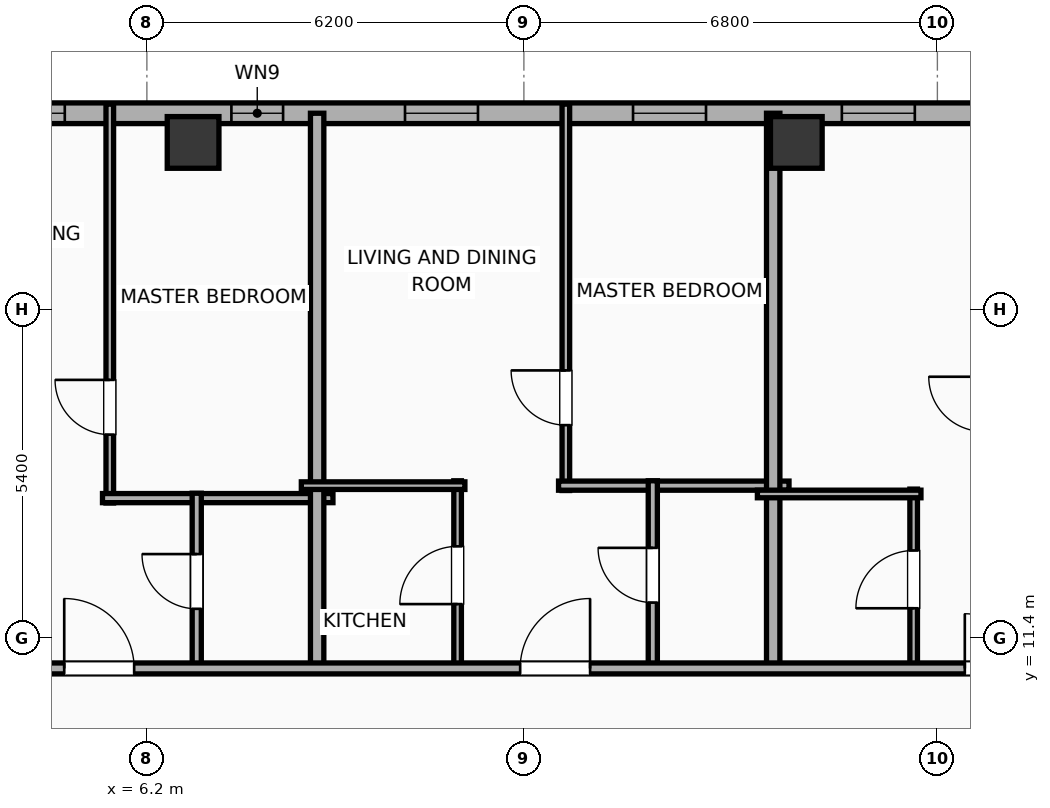
"""IFC4 building model, lengths in metres.
Left out: names, types, materials, properties, quantities, classifications, styles, units other than length and angle.
Written with IfcOpenShell. Run it as: python <this file> out.ifc"""

import sys

from ifc_helpers import new_model, si_unit, direction, frame, frame_2d, origin, origin_2d, place, context, subcontext, project, spatial, rectangle, hollow_rectangle, extrude, element, fill, save


model = new_model("IFC4")
c1 = context("Model", 3, precision=1e-05, world=origin(), true_north=direction((0.0, 1.0)))
c2 = subcontext(c1, "Body", "Model", "MODEL_VIEW")
j1 = project(units=[si_unit("LENGTHUNIT", "METRE"), si_unit("PLANEANGLEUNIT", "RADIAN")], contexts=[c1])
p1 = place(None, origin())
s1 = spatial("IfcSite", under=j1, at=p1, CompositionType="ELEMENT")
p2 = place(p1, origin())
s2 = spatial("IfcBuilding", under=s1, at=p2, CompositionType="ELEMENT")
p3 = place(p2, frame((0.0, 0.0, 243.1)))
s3 = spatial("IfcBuildingStorey", under=s2, at=p3, CompositionType="ELEMENT", Elevation=243.1)
for number, where, z_axis, x_axis in (
    (1, (16.88, 19.55, 0.0), (0.0, 0.0, 1.0), (1.0, 0.0, 0.0)),
    (2, (6.96, 19.55, 0.0), (0.0, 0.0, 1.0), (1.0, 0.0, 0.0)),
):
    element("IfcColumn", number, at=place(p3, frame(where, z_axis=z_axis, x_axis=x_axis)), inside=s3, PredefinedType="COLUMN", context=c2, shape_type="SweptSolid", body=[
        extrude(hollow_rectangle(XDim=0.85, YDim=0.85, WallThickness=0.028, at=origin_2d()), origin(), (0.0, 0.0, 1.0), 3.9),
    ])
p4 = place(p3, frame((-22.783, 20.03, 0.0), z_axis=(0.0, 0.0, 1.0), x_axis=(1.0, 0.0, 0.0)))
e3 = element("IfcWall", 3, at=p4, inside=s3, PredefinedType="ELEMENTEDWALL", context=c2, shape_type="SweptSolid", body=[
    extrude(rectangle(XDim=49.566, YDim=0.34, at=frame_2d((24.783, 0.0))), origin(), (0.0, 0.0, 1.0), 3.65),
])
p5 = place(p4, frame((6.211, 0.0, 0.75)))
e4 = element("IfcOpeningElement", 4, at=p5, cuts=e3, PredefinedType="OPENING", context=c2, shape_type="SweptSolid", body=[
    extrude(rectangle(XDim=2.4, YDim=2.1, at=frame_2d((1.2, 1.05))), frame((0.0, 0.18, 0.0), z_axis=(0.0, -1.0, 0.0), x_axis=(1.0, 0.0, 0.0)), (0.0, 0.0, 1.0), 0.36),
])
p6 = place(p4, frame((25.233, 0.0, 0.75)))
e5 = element("IfcOpeningElement", 5, at=p6, cuts=e3, PredefinedType="OPENING", context=c2, shape_type="SweptSolid", body=[
    extrude(rectangle(XDim=2.4, YDim=2.1, at=frame_2d((1.2, 1.05))), frame((0.0, 0.18, 0.0), z_axis=(0.0, -1.0, 0.0), x_axis=(1.0, 0.0, 0.0)), (0.0, 0.0, 1.0), 0.36),
])
p7 = place(p4, frame((3.511, 0.0, 0.75)))
e6 = element("IfcOpeningElement", 6, at=p7, cuts=e3, PredefinedType="OPENING", context=c2, shape_type="SweptSolid", body=[
    extrude(rectangle(XDim=1.2, YDim=2.05, at=frame_2d((0.6, 1.025))), frame((0.0, 0.18, 0.0), z_axis=(0.0, -1.0, 0.0), x_axis=(1.0, 0.0, 0.0)), (0.0, 0.0, 1.0), 0.36),
])
p8 = place(p4, frame((10.728, 0.0, 0.75)))
e7 = element("IfcOpeningElement", 7, at=p8, cuts=e3, PredefinedType="OPENING", context=c2, shape_type="SweptSolid", body=[
    extrude(rectangle(XDim=1.2, YDim=2.05, at=frame_2d((0.6, 1.025))), frame((0.0, 0.18, 0.0), z_axis=(0.0, -1.0, 0.0), x_axis=(1.0, 0.0, 0.0)), (0.0, 0.0, 1.0), 0.36),
])
p9 = place(p4, frame((14.478, 0.0, 0.75)))
e8 = element("IfcOpeningElement", 8, at=p9, cuts=e3, PredefinedType="OPENING", context=c2, shape_type="SweptSolid", body=[
    extrude(rectangle(XDim=1.2, YDim=2.05, at=frame_2d((0.6, 1.025))), frame((0.0, 0.18, 0.0), z_axis=(0.0, -1.0, 0.0), x_axis=(1.0, 0.0, 0.0)), (0.0, 0.0, 1.0), 0.36),
])
p10 = place(p4, frame((17.988, 0.0, 0.75)))
e9 = element("IfcOpeningElement", 9, at=p10, cuts=e3, PredefinedType="OPENING", context=c2, shape_type="SweptSolid", body=[
    extrude(rectangle(XDim=1.2, YDim=2.05, at=frame_2d((0.6, 1.025))), frame((0.0, 0.18, 0.0), z_axis=(0.0, -1.0, 0.0), x_axis=(1.0, 0.0, 0.0)), (0.0, 0.0, 1.0), 0.36),
])
p11 = place(p4, frame((21.978, 0.0, 0.75)))
e10 = element("IfcOpeningElement", 10, at=p11, cuts=e3, PredefinedType="OPENING", context=c2, shape_type="SweptSolid", body=[
    extrude(rectangle(XDim=1.2, YDim=2.05, at=frame_2d((0.6, 1.025))), frame((0.0, 0.18, 0.0), z_axis=(0.0, -1.0, 0.0), x_axis=(1.0, 0.0, 0.0)), (0.0, 0.0, 1.0), 0.36),
])
p12 = place(p4, frame((30.373, 0.0, 0.75)))
e11 = element("IfcOpeningElement", 11, at=p12, cuts=e3, PredefinedType="OPENING", context=c2, shape_type="SweptSolid", body=[
    extrude(rectangle(XDim=0.85, YDim=2.05, at=frame_2d((0.425, 1.025))), frame((0.0, 0.18, 0.0), z_axis=(0.0, -1.0, 0.0), x_axis=(1.0, 0.0, 0.0)), (0.0, 0.0, 1.0), 0.36),
])
p13 = place(p4, frame((33.228, 0.0, 0.75)))
e12 = element("IfcOpeningElement", 12, at=p13, cuts=e3, PredefinedType="OPENING", context=c2, shape_type="SweptSolid", body=[
    extrude(rectangle(XDim=1.2, YDim=2.05, at=frame_2d((0.6, 1.025))), frame((0.0, 0.18, 0.0), z_axis=(0.0, -1.0, 0.0), x_axis=(1.0, 0.0, 0.0)), (0.0, 0.0, 1.0), 0.36),
])
p14 = place(p4, frame((36.978, 0.0, 0.75)))
e13 = element("IfcOpeningElement", 13, at=p14, cuts=e3, PredefinedType="OPENING", context=c2, shape_type="SweptSolid", body=[
    extrude(rectangle(XDim=1.2, YDim=2.05, at=frame_2d((0.6, 1.025))), frame((0.0, 0.18, 0.0), z_axis=(0.0, -1.0, 0.0), x_axis=(1.0, 0.0, 0.0)), (0.0, 0.0, 1.0), 0.36),
])
p15 = place(p4, frame((40.412, 0.0, 0.75)))
e14 = element("IfcOpeningElement", 14, at=p15, cuts=e3, PredefinedType="OPENING", context=c2, shape_type="SweptSolid", body=[
    extrude(rectangle(XDim=1.2, YDim=2.05, at=frame_2d((0.6, 1.025))), frame((0.0, 0.18, 0.0), z_axis=(0.0, -1.0, 0.0), x_axis=(1.0, 0.0, 0.0)), (0.0, 0.0, 1.0), 0.36),
])
p16 = place(p4, frame((43.846, 0.0, 0.75)))
e15 = element("IfcOpeningElement", 15, at=p16, cuts=e3, PredefinedType="OPENING", context=c2, shape_type="SweptSolid", body=[
    extrude(rectangle(XDim=1.2, YDim=2.05, at=frame_2d((0.6, 1.025))), frame((0.0, 0.18, 0.0), z_axis=(0.0, -1.0, 0.0), x_axis=(1.0, 0.0, 0.0)), (0.0, 0.0, 1.0), 0.36),
])
p17 = place(p4, frame((46.814, 0.0, 0.75)))
e16 = element("IfcOpeningElement", 16, at=p17, cuts=e3, PredefinedType="OPENING", context=c2, shape_type="SweptSolid", body=[
    extrude(rectangle(XDim=1.2, YDim=2.05, at=frame_2d((0.6, 1.025))), frame((0.0, 0.18, 0.0), z_axis=(0.0, -1.0, 0.0), x_axis=(1.0, 0.0, 0.0)), (0.0, 0.0, 1.0), 0.36),
])
p18 = place(p3, frame((5.59, 13.621, 0.0), z_axis=(0.0, 0.0, 1.0), x_axis=(0.0, 1.0, 0.0)))
e17 = element("IfcWall", 17, at=p18, inside=s3, PredefinedType="PARTITIONING", context=c2, shape_type="SweptSolid", body=[
    extrude(rectangle(XDim=6.559, YDim=0.125, at=frame_2d((3.279, 0.0))), origin(), (0.0, 0.0, 1.0), 3.09),
])
p19 = place(p18, frame((1.124, 0.0, 0.0)))
e18 = element("IfcOpeningElement", 18, at=p19, cuts=e17, PredefinedType="OPENING", context=c2, shape_type="SweptSolid", body=[
    extrude(rectangle(XDim=0.9, YDim=2.05, at=frame_2d((0.45, 1.025))), frame((0.0, 0.073, 0.0), z_axis=(0.0, -1.0, 0.0), x_axis=(1.0, 0.0, 0.0)), (0.0, 0.0, 1.0), 0.145),
])
p20 = place(p3, frame((5.47, 13.701, 0.0), z_axis=(0.0, 0.0, 1.0), x_axis=(1.0, 0.0, 0.0)))
e19 = element("IfcWall", 19, at=p20, inside=s3, PredefinedType="PLUMBINGWALL", context=c2, shape_type="SweptSolid", body=[
    extrude(rectangle(XDim=3.79, YDim=0.15, at=frame_2d((1.895, 0.0))), origin(), (0.0, 0.0, 1.0), 3.65),
])
p21 = place(p3, frame((7.02, 10.88, 0.0), z_axis=(0.0, 0.0, 1.0), x_axis=(0.0, 1.0, 0.0)))
e20 = element("IfcWall", 20, at=p21, inside=s3, PredefinedType="PLUMBINGWALL", context=c2, shape_type="SweptSolid", body=[
    extrude(rectangle(XDim=2.901, YDim=0.15, at=frame_2d((1.451, 0.0))), origin(), (0.0, 0.0, 1.0), 3.65),
])
p22 = place(p21, frame((1.0, 0.0, 0.0)))
e21 = element("IfcOpeningElement", 21, at=p22, cuts=e20, PredefinedType="OPENING", context=c2, shape_type="SweptSolid", body=[
    extrude(rectangle(XDim=0.9, YDim=2.05, at=frame_2d((0.45, 1.025))), frame((0.0, 0.085, 0.0), z_axis=(0.0, -1.0, 0.0), x_axis=(1.0, 0.0, 0.0)), (0.0, 0.0, 1.0), 0.17),
])
p23 = place(p3, frame((9.0, 10.82, 0.0), z_axis=(0.0, 0.0, 1.0), x_axis=(0.0, 1.0, 0.0)))
e22 = element("IfcWall", 22, at=p23, inside=s3, PredefinedType="PARTITIONING", context=c2, shape_type="SweptSolid", body=[
    extrude(rectangle(XDim=9.21, YDim=0.22, at=frame_2d((4.605, 0.0))), origin(), (0.0, 0.0, 1.0), 3.65),
])
p24 = place(p3, frame((13.09, 13.826, 0.0), z_axis=(0.0, 0.0, 1.0), x_axis=(0.0, 1.0, 0.0)))
e23 = element("IfcWall", 23, at=p24, inside=s3, PredefinedType="PARTITIONING", context=c2, shape_type="SweptSolid", body=[
    extrude(rectangle(XDim=6.354, YDim=0.125, at=frame_2d((3.177, 0.0))), origin(), (0.0, 0.0, 1.0), 3.65),
])
p25 = place(p24, frame((1.075, 0.0, 0.0)))
e24 = element("IfcOpeningElement", 24, at=p25, cuts=e23, PredefinedType="OPENING", context=c2, shape_type="SweptSolid", body=[
    extrude(rectangle(XDim=0.9, YDim=2.05, at=frame_2d((0.45, 1.025))), frame((0.0, 0.073, 0.0), z_axis=(0.0, -1.0, 0.0), x_axis=(1.0, 0.0, 0.0)), (0.0, 0.0, 1.0), 0.145),
])
p26 = place(p3, frame((12.97, 13.906, 0.0), z_axis=(0.0, 0.0, 1.0), x_axis=(1.0, 0.0, 0.0)))
e25 = element("IfcWall", 25, at=p26, inside=s3, PredefinedType="PLUMBINGWALL", context=c2, shape_type="SweptSolid", body=[
    extrude(rectangle(XDim=3.79, YDim=0.15, at=frame_2d((1.895, 0.0))), origin(), (0.0, 0.0, 1.0), 3.65),
])
p27 = place(p3, frame((11.31, 10.88, 0.0), z_axis=(0.0, 0.0, 1.0), x_axis=(0.0, 1.0, 0.0)))
e26 = element("IfcWall", 26, at=p27, inside=s3, PredefinedType="PARTITIONING", context=c2, shape_type="SweptSolid", body=[
    extrude(rectangle(XDim=3.106, YDim=0.125, at=frame_2d((1.553, 0.0))), origin(), (0.0, 0.0, 1.0), 3.65),
])
p28 = place(p27, frame((1.078, 0.0, 0.0)))
e27 = element("IfcOpeningElement", 27, at=p28, cuts=e26, PredefinedType="OPENING", context=c2, shape_type="SweptSolid", body=[
    extrude(rectangle(XDim=0.95, YDim=2.05, at=frame_2d((0.475, 1.025))), frame((0.0, 0.073, 0.0), z_axis=(0.0, -1.0, 0.0), x_axis=(1.0, 0.0, 0.0)), (0.0, 0.0, 1.0), 0.145),
])
p29 = place(p3, frame((8.74, 13.906, 0.0), z_axis=(0.0, 0.0, 1.0), x_axis=(1.0, 0.0, 0.0)))
e28 = element("IfcWall", 28, at=p29, inside=s3, PredefinedType="PARTITIONING", context=c2, shape_type="SweptSolid", body=[
    extrude(rectangle(XDim=2.69, YDim=0.125, at=frame_2d((1.345, 0.0))), origin(), (0.0, 0.0, 1.0), 3.65),
])
p30 = place(p3, frame((14.52, 10.88, 0.0), z_axis=(0.0, 0.0, 1.0), x_axis=(0.0, 1.0, 0.0)))
e29 = element("IfcWall", 29, at=p30, inside=s3, PredefinedType="PLUMBINGWALL", context=c2, shape_type="SweptSolid", body=[
    extrude(rectangle(XDim=3.106, YDim=0.15, at=frame_2d((1.553, 0.0))), origin(), (0.0, 0.0, 1.0), 3.65),
])
p31 = place(p30, frame((1.103, 0.0, 0.0)))
e30 = element("IfcOpeningElement", 30, at=p31, cuts=e29, PredefinedType="OPENING", context=c2, shape_type="SweptSolid", body=[
    extrude(rectangle(XDim=0.9, YDim=2.05, at=frame_2d((0.45, 1.025))), frame((0.0, 0.085, 0.0), z_axis=(0.0, -1.0, 0.0), x_axis=(1.0, 0.0, 0.0)), (0.0, 0.0, 1.0), 0.17),
])
p32 = place(p3, frame((16.5, 10.82, 0.0), z_axis=(0.0, 0.0, 1.0), x_axis=(0.0, 1.0, 0.0)))
e31 = element("IfcWall", 31, at=p32, inside=s3, PredefinedType="PARTITIONING", context=c2, shape_type="SweptSolid", body=[
    extrude(rectangle(XDim=9.21, YDim=0.22, at=frame_2d((4.605, 0.0))), origin(), (0.0, 0.0, 1.0), 3.09),
])
p33 = place(p3, frame((18.81, 10.88, 0.0), z_axis=(0.0, 0.0, 1.0), x_axis=(0.0, 1.0, 0.0)))
e32 = element("IfcWall", 32, at=p33, inside=s3, PredefinedType="PARTITIONING", context=c2, shape_type="SweptSolid", body=[
    extrude(rectangle(XDim=2.969, YDim=0.125, at=frame_2d((1.485, 0.0))), origin(), (0.0, 0.0, 1.0), 3.65),
])
p34 = place(p33, frame((1.01, 0.0, 0.0)))
e33 = element("IfcOpeningElement", 33, at=p34, cuts=e32, PredefinedType="OPENING", context=c2, shape_type="SweptSolid", body=[
    extrude(rectangle(XDim=0.95, YDim=2.05, at=frame_2d((0.475, 1.025))), frame((0.0, 0.073, 0.0), z_axis=(0.0, -1.0, 0.0), x_axis=(1.0, 0.0, 0.0)), (0.0, 0.0, 1.0), 0.145),
])
p35 = place(p3, frame((16.24, 13.769, 0.0), z_axis=(0.0, 0.0, 1.0), x_axis=(1.0, 0.0, 0.0)))
e34 = element("IfcWall", 34, at=p35, inside=s3, PredefinedType="PARTITIONING", context=c2, shape_type="SweptSolid", body=[
    extrude(rectangle(XDim=2.69, YDim=0.125, at=frame_2d((1.345, 0.0))), origin(), (0.0, 0.0, 1.0), 3.65),
])
p36 = place(p3, frame((-26.23, 10.9, 0.0), z_axis=(0.0, 0.0, 1.0), x_axis=(1.0, 0.0, 0.0)))
e35 = element("IfcWall", 35, at=p36, inside=s3, PredefinedType="PARTITIONING", context=c2, shape_type="SweptSolid", body=[
    extrude(rectangle(XDim=56.46, YDim=0.18, at=frame_2d((28.23, 0.0))), origin(), (0.0, 0.0, 1.0), 3.65),
])
p37 = place(p36, frame((2.825, 0.0, 0.0)))
e36 = element("IfcOpeningElement", 36, at=p37, cuts=e35, PredefinedType="OPENING", context=c2, shape_type="SweptSolid", body=[
    extrude(rectangle(XDim=0.9, YDim=2.05, at=frame_2d((0.45, 1.025))), frame((0.0, 0.1, 0.0), z_axis=(0.0, -1.0, 0.0), x_axis=(1.0, 0.0, 0.0)), (0.0, 0.0, 1.0), 0.2),
])
p38 = place(p36, frame((10.135, 0.0, 0.0)))
e37 = element("IfcOpeningElement", 37, at=p38, cuts=e35, PredefinedType="OPENING", context=c2, shape_type="SweptSolid", body=[
    extrude(rectangle(XDim=1.15, YDim=2.05, at=frame_2d((0.575, 1.025))), frame((0.0, 0.1, 0.0), z_axis=(0.0, -1.0, 0.0), x_axis=(1.0, 0.0, 0.0)), (0.0, 0.0, 1.0), 0.2),
])
p39 = place(p36, frame((16.069, 0.0, 0.0)))
e38 = element("IfcOpeningElement", 38, at=p39, cuts=e35, PredefinedType="OPENING", context=c2, shape_type="SweptSolid", body=[
    extrude(rectangle(XDim=1.15, YDim=2.05, at=frame_2d((0.575, 1.025))), frame((0.0, 0.1, 0.0), z_axis=(0.0, -1.0, 0.0), x_axis=(1.0, 0.0, 0.0)), (0.0, 0.0, 1.0), 0.2),
])
p40 = place(p36, frame((23.567, 0.0, 0.0)))
e39 = element("IfcOpeningElement", 39, at=p40, cuts=e35, PredefinedType="OPENING", context=c2, shape_type="SweptSolid", body=[
    extrude(rectangle(XDim=1.15, YDim=2.05, at=frame_2d((0.575, 1.025))), frame((0.0, 0.1, 0.0), z_axis=(0.0, -1.0, 0.0), x_axis=(1.0, 0.0, 0.0)), (0.0, 0.0, 1.0), 0.2),
])
p41 = place(p36, frame((31.071, 0.0, 0.0)))
e40 = element("IfcOpeningElement", 40, at=p41, cuts=e35, PredefinedType="OPENING", context=c2, shape_type="SweptSolid", body=[
    extrude(rectangle(XDim=1.15, YDim=2.05, at=frame_2d((0.575, 1.025))), frame((0.0, 0.1, 0.0), z_axis=(0.0, -1.0, 0.0), x_axis=(1.0, 0.0, 0.0)), (0.0, 0.0, 1.0), 0.2),
])
p42 = place(p36, frame((38.569, 0.0, 0.0)))
e41 = element("IfcOpeningElement", 41, at=p42, cuts=e35, PredefinedType="OPENING", context=c2, shape_type="SweptSolid", body=[
    extrude(rectangle(XDim=1.15, YDim=2.05, at=frame_2d((0.575, 1.025))), frame((0.0, 0.1, 0.0), z_axis=(0.0, -1.0, 0.0), x_axis=(1.0, 0.0, 0.0)), (0.0, 0.0, 1.0), 0.2),
])
p43 = place(p36, frame((45.881, 0.0, 0.0)))
e42 = element("IfcOpeningElement", 42, at=p43, cuts=e35, PredefinedType="OPENING", context=c2, shape_type="SweptSolid", body=[
    extrude(rectangle(XDim=0.9, YDim=2.05, at=frame_2d((0.45, 1.025))), frame((0.0, 0.1, 0.0), z_axis=(0.0, -1.0, 0.0), x_axis=(1.0, 0.0, 0.0)), (0.0, 0.0, 1.0), 0.2),
])
p44 = place(p36, frame((52.775, 0.0, 0.0)))
e43 = element("IfcOpeningElement", 43, at=p44, cuts=e35, PredefinedType="OPENING", context=c2, shape_type="SweptSolid", body=[
    extrude(rectangle(XDim=0.9, YDim=2.05, at=frame_2d((0.45, 1.025))), frame((0.0, 0.1, 0.0), z_axis=(0.0, -1.0, 0.0), x_axis=(1.0, 0.0, 0.0)), (0.0, 0.0, 1.0), 0.2),
])
p45 = place(p6, origin())
e44 = element("IfcWindow", 44, at=p45, inside=s3, PartitioningType="SINGLE_PANEL", PredefinedType="WINDOW", context=c2, shape_type="SweptSolid", body=[
    extrude(rectangle(XDim=2.4, YDim=2.1, at=frame_2d((1.2, 1.05))), frame((0.0, 0.03, 0.0), z_axis=(0.0, -1.0, 0.0), x_axis=(1.0, 0.0, 0.0)), (0.0, 0.0, 1.0), 0.06),
])
fill(e5, e44)
p46 = place(p12, origin())
e45 = element("IfcWindow", 45, at=p46, inside=s3, PartitioningType="SINGLE_PANEL", PredefinedType="WINDOW", context=c2, shape_type="SweptSolid", body=[
    extrude(rectangle(XDim=0.85, YDim=2.05, at=frame_2d((0.425, 1.025))), frame((0.0, 0.03, 0.0), z_axis=(0.0, -1.0, 0.0), x_axis=(1.0, 0.0, 0.0)), (0.0, 0.0, 1.0), 0.06),
])
fill(e11, e45)
p47 = place(p13, origin())
e46 = element("IfcWindow", 46, at=p47, inside=s3, PartitioningType="SINGLE_PANEL", PredefinedType="WINDOW", context=c2, shape_type="SweptSolid", body=[
    extrude(rectangle(XDim=1.2, YDim=2.05, at=frame_2d((0.6, 1.025))), frame((0.0, 0.03, 0.0), z_axis=(0.0, -1.0, 0.0), x_axis=(1.0, 0.0, 0.0)), (0.0, 0.0, 1.0), 0.06),
])
fill(e12, e46)
p48 = place(p14, origin())
e47 = element("IfcWindow", 47, at=p48, inside=s3, PartitioningType="SINGLE_PANEL", PredefinedType="WINDOW", context=c2, shape_type="SweptSolid", body=[
    extrude(rectangle(XDim=1.2, YDim=2.05, at=frame_2d((0.6, 1.025))), frame((0.0, 0.03, 0.0), z_axis=(0.0, -1.0, 0.0), x_axis=(1.0, 0.0, 0.0)), (0.0, 0.0, 1.0), 0.06),
])
fill(e13, e47)
p49 = place(p15, origin())
e48 = element("IfcWindow", 48, at=p49, inside=s3, PartitioningType="SINGLE_PANEL", PredefinedType="WINDOW", context=c2, shape_type="SweptSolid", body=[
    extrude(rectangle(XDim=1.2, YDim=2.05, at=frame_2d((0.6, 1.025))), frame((0.0, 0.03, 0.0), z_axis=(0.0, -1.0, 0.0), x_axis=(1.0, 0.0, 0.0)), (0.0, 0.0, 1.0), 0.06),
])
fill(e14, e48)
p50 = place(p19, origin())
e49 = element("IfcDoor", 49, at=p50, inside=s3, OperationType="SINGLE_SWING_RIGHT", PredefinedType="DOOR", context=c2, shape_type="SweptSolid", body=[
    extrude(rectangle(XDim=0.9, YDim=2.05, at=frame_2d((0.45, 1.025))), frame((0.0, 0.025, 0.0), z_axis=(0.0, -1.0, 0.0), x_axis=(1.0, 0.0, 0.0)), (0.0, 0.0, 1.0), 0.05),
])
fill(e18, e49)
p51 = place(p22, origin())
e50 = element("IfcDoor", 50, at=p51, inside=s3, OperationType="SINGLE_SWING_RIGHT", PredefinedType="DOOR", context=c2, shape_type="SweptSolid", body=[
    extrude(rectangle(XDim=0.9, YDim=2.05, at=frame_2d((0.45, 1.025))), frame((0.0, 0.025, 0.0), z_axis=(0.0, -1.0, 0.0), x_axis=(1.0, 0.0, 0.0)), (0.0, 0.0, 1.0), 0.05),
])
fill(e21, e50)
p52 = place(p25, origin())
e51 = element("IfcDoor", 51, at=p52, inside=s3, OperationType="SINGLE_SWING_RIGHT", PredefinedType="DOOR", context=c2, shape_type="SweptSolid", body=[
    extrude(rectangle(XDim=0.9, YDim=2.05, at=frame_2d((0.45, 1.025))), frame((0.0, 0.025, 0.0), z_axis=(0.0, -1.0, 0.0), x_axis=(1.0, 0.0, 0.0)), (0.0, 0.0, 1.0), 0.05),
])
fill(e24, e51)
p53 = place(p28, origin())
e52 = element("IfcDoor", 52, at=p53, inside=s3, OperationType="SINGLE_SWING_LEFT", PredefinedType="DOOR", context=c2, shape_type="SweptSolid", body=[
    extrude(rectangle(XDim=0.95, YDim=2.05, at=frame_2d((0.475, 1.025))), frame((0.0, 0.025, 0.0), z_axis=(0.0, -1.0, 0.0), x_axis=(1.0, 0.0, 0.0)), (0.0, 0.0, 1.0), 0.05),
])
fill(e27, e52)
p54 = place(p31, origin())
e53 = element("IfcDoor", 53, at=p54, inside=s3, OperationType="SINGLE_SWING_RIGHT", PredefinedType="DOOR", context=c2, shape_type="SweptSolid", body=[
    extrude(rectangle(XDim=0.9, YDim=2.05, at=frame_2d((0.45, 1.025))), frame((0.0, 0.025, 0.0), z_axis=(0.0, -1.0, 0.0), x_axis=(1.0, 0.0, 0.0)), (0.0, 0.0, 1.0), 0.05),
])
fill(e30, e53)
p55 = place(p34, origin())
e54 = element("IfcDoor", 54, at=p55, inside=s3, OperationType="SINGLE_SWING_LEFT", PredefinedType="DOOR", context=c2, shape_type="SweptSolid", body=[
    extrude(rectangle(XDim=0.95, YDim=2.05, at=frame_2d((0.475, 1.025))), frame((0.0, 0.025, 0.0), z_axis=(0.0, -1.0, 0.0), x_axis=(1.0, 0.0, 0.0)), (0.0, 0.0, 1.0), 0.05),
])
fill(e33, e54)
p56 = place(p41, origin())
e55 = element("IfcDoor", 55, at=p56, inside=s3, OperationType="SINGLE_SWING_LEFT", PredefinedType="DOOR", context=c2, shape_type="SweptSolid", body=[
    extrude(rectangle(XDim=1.15, YDim=2.05, at=frame_2d((0.575, 1.025))), frame((0.0, 0.025, 0.0), z_axis=(0.0, -1.0, 0.0), x_axis=(1.0, 0.0, 0.0)), (0.0, 0.0, 1.0), 0.05),
])
fill(e40, e55)
p57 = place(p42, origin())
e56 = element("IfcDoor", 56, at=p57, inside=s3, OperationType="SINGLE_SWING_RIGHT", PredefinedType="DOOR", context=c2, shape_type="SweptSolid", body=[
    extrude(rectangle(XDim=1.15, YDim=2.05, at=frame_2d((0.575, 1.025))), frame((0.0, 0.025, 0.0), z_axis=(0.0, -1.0, 0.0), x_axis=(1.0, 0.0, 0.0)), (0.0, 0.0, 1.0), 0.05),
])
fill(e41, e56)
p58 = place(p43, origin())
e57 = element("IfcDoor", 57, at=p58, inside=s3, OperationType="SINGLE_SWING_LEFT", PredefinedType="DOOR", context=c2, shape_type="SweptSolid", body=[
    extrude(rectangle(XDim=0.9, YDim=2.05, at=frame_2d((0.45, 1.025))), frame((0.0, 0.025, 0.0), z_axis=(0.0, -1.0, 0.0), x_axis=(1.0, 0.0, 0.0)), (0.0, 0.0, 1.0), 0.05),
])
fill(e42, e57)
save(model, sys.argv[1])
